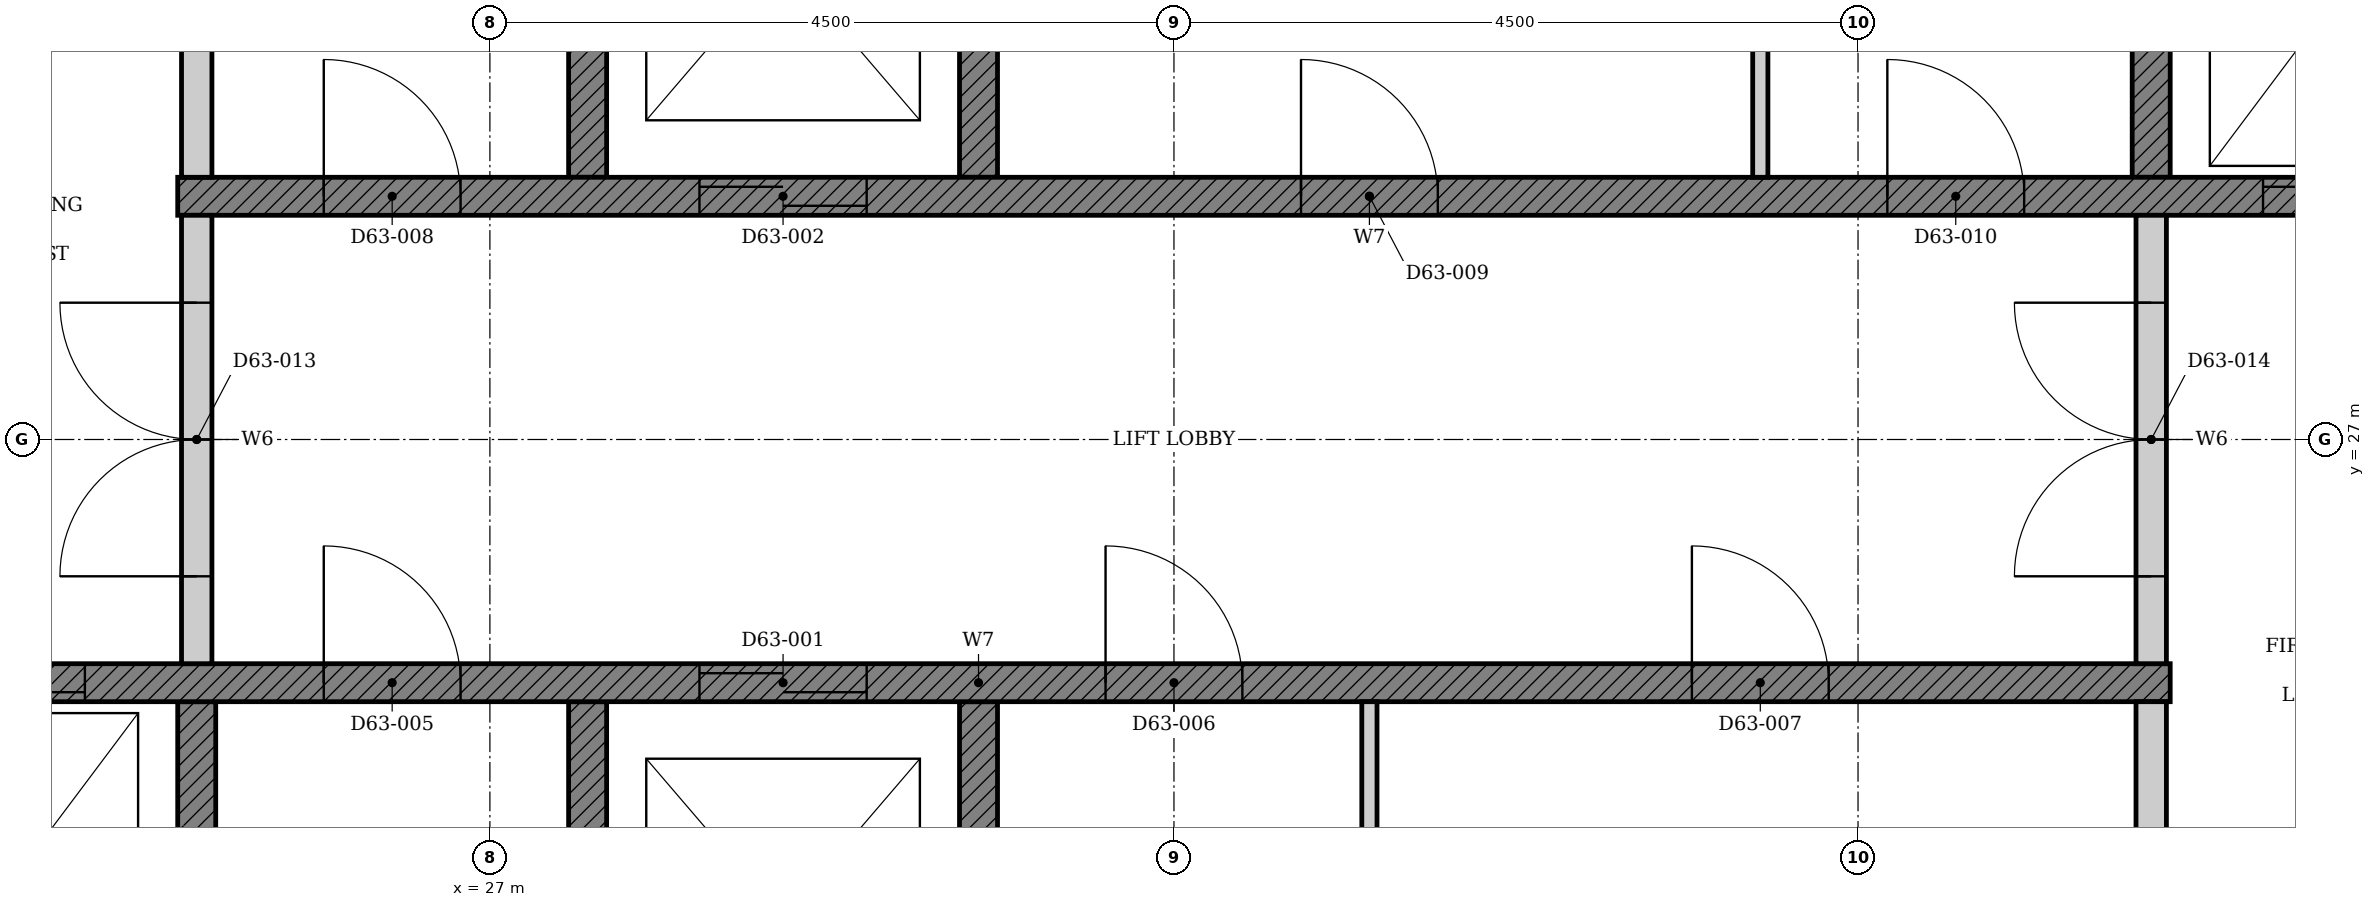
"""IFC4 building model, lengths in metres.
Left out: names, types, materials, properties, quantities, classifications, styles, units other than length and angle.
Written with IfcOpenShell. Run it as: python <this file> out.ifc"""

import sys

from ifc_helpers import new_model, si_unit, direction, frame, frame_2d, origin, place, context, subcontext, project, spatial, polyline, rectangle, outline, extrude, element, fill, save


model = new_model("IFC4")
c1 = context("Model", 3, precision=1e-05, world=origin(), true_north=direction((0.0, 1.0)))
c2 = subcontext(c1, "Body", "Model", "MODEL_VIEW")
j1 = project(units=[si_unit("LENGTHUNIT", "METRE"), si_unit("PLANEANGLEUNIT", "RADIAN")], contexts=[c1])
p1 = place(None, origin())
s1 = spatial("IfcSite", under=j1, at=p1, CompositionType="ELEMENT")
p2 = place(p1, origin())
s2 = spatial("IfcBuilding", under=s1, at=p2, CompositionType="ELEMENT")
p3 = place(p2, frame((0.0, 0.0, 249.0)))
s3 = spatial("IfcBuildingStorey", under=s2, at=p3, CompositionType="ELEMENT", Elevation=249.0)
p4 = place(p3, origin())
e1 = element("IfcWall", 1, at=p4, inside=s3, PredefinedType="SHEAR", context=c2, shape_type="SweptSolid", body=[
    extrude(outline(polyline([(22.375, 22.35), (25.197, 22.35), (25.197, 25.275), (24.947, 25.275), (24.947, 22.65), (22.625, 22.65), (22.625, 25.275), (22.375, 25.275), (22.375, 22.35)])), origin(), (0.0, 0.0, 1.0), 3.4),
])
p5 = place(p3, origin())
e2 = element("IfcWall", 2, at=p5, inside=s3, PredefinedType="SHEAR", context=c2, shape_type="SweptSolid", body=[
    extrude(outline(polyline([(27.518, 22.35), (30.339, 22.35), (30.339, 25.275), (30.089, 25.275), (30.089, 22.65), (27.768, 22.65), (27.768, 25.275), (27.518, 25.275), (27.518, 22.35)])), origin(), (0.0, 0.0, 1.0), 3.4),
])
p6 = place(p3, origin())
e3 = element("IfcWall", 3, at=p6, inside=s3, PredefinedType="SHEAR", context=c2, shape_type="SweptSolid", body=[
    extrude(outline(polyline([(27.518, 28.725), (27.768, 28.725), (27.768, 31.35), (30.089, 31.35), (30.089, 28.725), (30.339, 28.725), (30.339, 31.65), (27.518, 31.65), (27.518, 28.725)])), origin(), (0.0, 0.0, 1.0), 3.4),
])
p7 = place(p3, origin())
e4 = element("IfcWall", 4, at=p7, inside=s3, PredefinedType="SHEAR", context=c2, shape_type="SweptSolid", body=[
    extrude(outline(polyline([(37.803, 28.725), (38.053, 28.725), (38.053, 31.35), (40.375, 31.35), (40.375, 28.725), (40.625, 28.725), (40.625, 31.65), (37.803, 31.65), (37.803, 28.725)])), origin(), (0.0, 0.0, 1.0), 3.4),
])
p8 = place(p3, frame((22.375, 25.4, 0.0), z_axis=(0.0, 0.0, 1.0), x_axis=(1.0, 0.0, 0.0)))
e5 = element("IfcWall", 5, at=p8, inside=s3, PredefinedType="SHEAR", context=c2, shape_type="SweptSolid", body=[
    extrude(rectangle(XDim=15.678, YDim=0.25, at=frame_2d((7.839, 0.0))), origin(), (0.0, 0.0, 1.0), 3.4),
])
p9 = place(p8, frame((6.004, 0.0, 0.0)))
e6 = element("IfcOpeningElement", 6, at=p9, cuts=e5, PredefinedType="OPENING", context=c2, shape_type="SweptSolid", body=[
    extrude(rectangle(XDim=1.1, YDim=2.1, at=frame_2d((0.55, 1.05))), frame((0.0, 0.135, 0.0), z_axis=(0.0, -1.0, 0.0), x_axis=(1.0, 0.0, 0.0)), (0.0, 0.0, 1.0), 0.27),
])
p10 = place(p8, frame((0.861, 0.0, 0.0)))
e7 = element("IfcOpeningElement", 7, at=p10, cuts=e5, PredefinedType="OPENING", context=c2, shape_type="SweptSolid", body=[
    extrude(rectangle(XDim=1.1, YDim=2.1, at=frame_2d((0.55, 1.05))), frame((0.0, 0.135, 0.0), z_axis=(0.0, -1.0, 0.0), x_axis=(1.0, 0.0, 0.0)), (0.0, 0.0, 1.0), 0.27),
])
p11 = place(p8, frame((3.532, 0.0, 0.0)))
e8 = element("IfcOpeningElement", 8, at=p11, cuts=e5, PredefinedType="OPENING", context=c2, shape_type="SweptSolid", body=[
    extrude(rectangle(XDim=0.9, YDim=2.1, at=frame_2d((0.45, 1.05))), frame((0.0, 0.135, 0.0), z_axis=(0.0, -1.0, 0.0), x_axis=(1.0, 0.0, 0.0)), (0.0, 0.0, 1.0), 0.27),
])
p12 = place(p8, frame((8.675, 0.0, 0.0)))
e9 = element("IfcOpeningElement", 9, at=p12, cuts=e5, PredefinedType="OPENING", context=c2, shape_type="SweptSolid", body=[
    extrude(rectangle(XDim=0.9, YDim=2.1, at=frame_2d((0.45, 1.05))), frame((0.0, 0.135, 0.0), z_axis=(0.0, -1.0, 0.0), x_axis=(1.0, 0.0, 0.0)), (0.0, 0.0, 1.0), 0.27),
])
p13 = place(p8, frame((12.532, 0.0, 0.0)))
e10 = element("IfcOpeningElement", 10, at=p13, cuts=e5, PredefinedType="OPENING", context=c2, shape_type="SweptSolid", body=[
    extrude(rectangle(XDim=0.9, YDim=2.1, at=frame_2d((0.45, 1.05))), frame((0.0, 0.135, 0.0), z_axis=(0.0, -1.0, 0.0), x_axis=(1.0, 0.0, 0.0)), (0.0, 0.0, 1.0), 0.27),
])
p14 = place(p3, frame((24.947, 28.6, 0.0), z_axis=(0.0, 0.0, 1.0), x_axis=(1.0, 0.0, 0.0)))
e11 = element("IfcWall", 11, at=p14, inside=s3, PredefinedType="SHEAR", context=c2, shape_type="SweptSolid", body=[
    extrude(rectangle(XDim=15.678, YDim=0.25, at=frame_2d((7.839, 0.0))), origin(), (0.0, 0.0, 1.0), 3.4),
])
p15 = place(p14, frame((3.432, 0.0, 0.0)))
e12 = element("IfcOpeningElement", 12, at=p15, cuts=e11, PredefinedType="OPENING", context=c2, shape_type="SweptSolid", body=[
    extrude(rectangle(XDim=1.1, YDim=2.1, at=frame_2d((0.55, 1.05))), frame((0.0, 0.135, 0.0), z_axis=(0.0, -1.0, 0.0), x_axis=(1.0, 0.0, 0.0)), (0.0, 0.0, 1.0), 0.27),
])
p16 = place(p14, frame((13.718, 0.0, 0.0)))
e13 = element("IfcOpeningElement", 13, at=p16, cuts=e11, PredefinedType="OPENING", context=c2, shape_type="SweptSolid", body=[
    extrude(rectangle(XDim=1.1, YDim=2.1, at=frame_2d((0.55, 1.05))), frame((0.0, 0.135, 0.0), z_axis=(0.0, -1.0, 0.0), x_axis=(1.0, 0.0, 0.0)), (0.0, 0.0, 1.0), 0.27),
])
p17 = place(p14, frame((0.961, 0.0, 0.0)))
e14 = element("IfcOpeningElement", 14, at=p17, cuts=e11, PredefinedType="OPENING", context=c2, shape_type="SweptSolid", body=[
    extrude(rectangle(XDim=0.9, YDim=2.1, at=frame_2d((0.45, 1.05))), frame((0.0, 0.135, 0.0), z_axis=(0.0, -1.0, 0.0), x_axis=(1.0, 0.0, 0.0)), (0.0, 0.0, 1.0), 0.27),
])
p18 = place(p14, frame((7.389, 0.0, 0.0)))
e15 = element("IfcOpeningElement", 15, at=p18, cuts=e11, PredefinedType="OPENING", context=c2, shape_type="SweptSolid", body=[
    extrude(rectangle(XDim=0.9, YDim=2.1, at=frame_2d((0.45, 1.05))), frame((0.0, 0.135, 0.0), z_axis=(0.0, -1.0, 0.0), x_axis=(1.0, 0.0, 0.0)), (0.0, 0.0, 1.0), 0.27),
])
p19 = place(p14, frame((11.246, 0.0, 0.0)))
e16 = element("IfcOpeningElement", 16, at=p19, cuts=e11, PredefinedType="OPENING", context=c2, shape_type="SweptSolid", body=[
    extrude(rectangle(XDim=0.9, YDim=2.1, at=frame_2d((0.45, 1.05))), frame((0.0, 0.135, 0.0), z_axis=(0.0, -1.0, 0.0), x_axis=(1.0, 0.0, 0.0)), (0.0, 0.0, 1.0), 0.27),
])
p20 = place(p3, frame((37.928, 22.65, 0.0), z_axis=(0.0, 0.0, 1.0), x_axis=(0.0, 1.0, 0.0)))
e17 = element("IfcWall", 17, at=p20, inside=s3, PredefinedType="PARTITIONING", context=c2, shape_type="SweptSolid", body=[
    extrude(rectangle(XDim=2.625, YDim=0.2, at=frame_2d((1.312, 0.0))), origin(), (0.0, 0.0, 1.0), 3.4),
])
p21 = place(p3, frame((32.786, 22.65, 0.0), z_axis=(0.0, 0.0, 1.0), x_axis=(0.0, 1.0, 0.0)))
e18 = element("IfcWall", 18, at=p21, inside=s3, PredefinedType="PARTITIONING", context=c2, shape_type="SweptSolid", body=[
    extrude(rectangle(XDim=2.625, YDim=0.1, at=frame_2d((1.312, 0.0))), origin(), (0.0, 0.0, 1.0), 3.4),
])
p22 = place(p3, frame((25.072, 28.725, 0.0), z_axis=(0.0, 0.0, 1.0), x_axis=(0.0, 1.0, 0.0)))
e19 = element("IfcWall", 19, at=p22, inside=s3, PredefinedType="PARTITIONING", context=c2, shape_type="SweptSolid", body=[
    extrude(rectangle(XDim=2.625, YDim=0.2, at=frame_2d((1.312, 0.0))), origin(), (0.0, 0.0, 1.0), 3.4),
])
p23 = place(p3, frame((35.357, 28.725, 0.0), z_axis=(0.0, 0.0, 1.0), x_axis=(0.0, 1.0, 0.0)))
e20 = element("IfcWall", 20, at=p23, inside=s3, PredefinedType="PARTITIONING", context=c2, shape_type="SweptSolid", body=[
    extrude(rectangle(XDim=2.625, YDim=0.1, at=frame_2d((1.312, 0.0))), origin(), (0.0, 0.0, 1.0), 3.4),
])
p24 = place(p3, frame((25.072, 25.525, 0.0), z_axis=(0.0, 0.0, 1.0), x_axis=(0.0, 1.0, 0.0)))
e21 = element("IfcWall", 21, at=p24, inside=s3, PredefinedType="PARTITIONING", context=c2, shape_type="SweptSolid", body=[
    extrude(rectangle(XDim=2.95, YDim=0.2, at=frame_2d((1.475, 0.0))), origin(), (0.0, 0.0, 1.0), 3.4),
])
p25 = place(p24, frame((0.575, 0.0, 0.0)))
e22 = element("IfcOpeningElement", 22, at=p25, cuts=e21, PredefinedType="OPENING", context=c2, shape_type="SweptSolid", body=[
    extrude(rectangle(XDim=1.8, YDim=2.1, at=frame_2d((0.9, 1.05))), frame((0.0, 0.11, 0.0), z_axis=(0.0, -1.0, 0.0), x_axis=(1.0, 0.0, 0.0)), (0.0, 0.0, 1.0), 0.22),
])
p26 = place(p3, frame((37.928, 25.525, 0.0), z_axis=(0.0, 0.0, 1.0), x_axis=(0.0, 1.0, 0.0)))
e23 = element("IfcWall", 23, at=p26, inside=s3, PredefinedType="PARTITIONING", context=c2, shape_type="SweptSolid", body=[
    extrude(rectangle(XDim=2.95, YDim=0.2, at=frame_2d((1.475, 0.0))), origin(), (0.0, 0.0, 1.0), 3.4),
])
p27 = place(p26, frame((0.575, 0.0, 0.0)))
e24 = element("IfcOpeningElement", 24, at=p27, cuts=e23, PredefinedType="OPENING", context=c2, shape_type="SweptSolid", body=[
    extrude(rectangle(XDim=1.8, YDim=2.1, at=frame_2d((0.9, 1.05))), frame((0.0, 0.11, 0.0), z_axis=(0.0, -1.0, 0.0), x_axis=(1.0, 0.0, 0.0)), (0.0, 0.0, 1.0), 0.22),
])
p28 = place(p9, origin())
e25 = element("IfcDoor", 25, at=p28, inside=s3, OperationType="DOUBLE_DOOR_SLIDING", PredefinedType="DOOR", context=c2, shape_type="SweptSolid", body=[
    extrude(rectangle(XDim=1.1, YDim=2.1, at=frame_2d((0.55, 1.05))), frame((0.0, 0.025, 0.0), z_axis=(0.0, -1.0, 0.0), x_axis=(1.0, 0.0, 0.0)), (0.0, 0.0, 1.0), 0.05),
])
fill(e6, e25)
p29 = place(p15, origin())
e26 = element("IfcDoor", 26, at=p29, inside=s3, OperationType="DOUBLE_DOOR_SLIDING", PredefinedType="DOOR", context=c2, shape_type="SweptSolid", body=[
    extrude(rectangle(XDim=1.1, YDim=2.1, at=frame_2d((0.55, 1.05))), frame((0.0, 0.025, 0.0), z_axis=(0.0, -1.0, 0.0), x_axis=(1.0, 0.0, 0.0)), (0.0, 0.0, 1.0), 0.05),
])
fill(e12, e26)
p30 = place(p10, origin())
e27 = element("IfcDoor", 27, at=p30, inside=s3, OperationType="DOUBLE_DOOR_SLIDING", PredefinedType="DOOR", context=c2, shape_type="SweptSolid", body=[
    extrude(rectangle(XDim=1.1, YDim=2.1, at=frame_2d((0.55, 1.05))), frame((0.0, 0.025, 0.0), z_axis=(0.0, -1.0, 0.0), x_axis=(1.0, 0.0, 0.0)), (0.0, 0.0, 1.0), 0.05),
])
fill(e7, e27)
p31 = place(p16, origin())
e28 = element("IfcDoor", 28, at=p31, inside=s3, OperationType="DOUBLE_DOOR_SLIDING", PredefinedType="DOOR", context=c2, shape_type="SweptSolid", body=[
    extrude(rectangle(XDim=1.1, YDim=2.1, at=frame_2d((0.55, 1.05))), frame((0.0, 0.025, 0.0), z_axis=(0.0, -1.0, 0.0), x_axis=(1.0, 0.0, 0.0)), (0.0, 0.0, 1.0), 0.05),
])
fill(e13, e28)
p32 = place(p11, origin())
e29 = element("IfcDoor", 29, at=p32, inside=s3, OperationType="SINGLE_SWING_LEFT", PredefinedType="DOOR", context=c2, shape_type="SweptSolid", body=[
    extrude(rectangle(XDim=0.9, YDim=2.1, at=frame_2d((0.45, 1.05))), frame((0.0, 0.025, 0.0), z_axis=(0.0, -1.0, 0.0), x_axis=(1.0, 0.0, 0.0)), (0.0, 0.0, 1.0), 0.05),
])
fill(e8, e29)
p33 = place(p12, origin())
e30 = element("IfcDoor", 30, at=p33, inside=s3, OperationType="SINGLE_SWING_LEFT", PredefinedType="DOOR", context=c2, shape_type="SweptSolid", body=[
    extrude(rectangle(XDim=0.9, YDim=2.1, at=frame_2d((0.45, 1.05))), frame((0.0, 0.025, 0.0), z_axis=(0.0, -1.0, 0.0), x_axis=(1.0, 0.0, 0.0)), (0.0, 0.0, 1.0), 0.05),
])
fill(e9, e30)
p34 = place(p13, origin())
e31 = element("IfcDoor", 31, at=p34, inside=s3, OperationType="SINGLE_SWING_LEFT", PredefinedType="DOOR", context=c2, shape_type="SweptSolid", body=[
    extrude(rectangle(XDim=0.9, YDim=2.1, at=frame_2d((0.45, 1.05))), frame((0.0, 0.025, 0.0), z_axis=(0.0, -1.0, 0.0), x_axis=(1.0, 0.0, 0.0)), (0.0, 0.0, 1.0), 0.05),
])
fill(e10, e31)
p35 = place(p17, origin())
e32 = element("IfcDoor", 32, at=p35, inside=s3, OperationType="SINGLE_SWING_LEFT", PredefinedType="DOOR", context=c2, shape_type="SweptSolid", body=[
    extrude(rectangle(XDim=0.9, YDim=2.1, at=frame_2d((0.45, 1.05))), frame((0.0, 0.025, 0.0), z_axis=(0.0, -1.0, 0.0), x_axis=(1.0, 0.0, 0.0)), (0.0, 0.0, 1.0), 0.05),
])
fill(e14, e32)
p36 = place(p18, origin())
e33 = element("IfcDoor", 33, at=p36, inside=s3, OperationType="SINGLE_SWING_LEFT", PredefinedType="DOOR", context=c2, shape_type="SweptSolid", body=[
    extrude(rectangle(XDim=0.9, YDim=2.1, at=frame_2d((0.45, 1.05))), frame((0.0, 0.025, 0.0), z_axis=(0.0, -1.0, 0.0), x_axis=(1.0, 0.0, 0.0)), (0.0, 0.0, 1.0), 0.05),
])
fill(e15, e33)
p37 = place(p19, origin())
e34 = element("IfcDoor", 34, at=p37, inside=s3, OperationType="SINGLE_SWING_LEFT", PredefinedType="DOOR", context=c2, shape_type="SweptSolid", body=[
    extrude(rectangle(XDim=0.9, YDim=2.1, at=frame_2d((0.45, 1.05))), frame((0.0, 0.025, 0.0), z_axis=(0.0, -1.0, 0.0), x_axis=(1.0, 0.0, 0.0)), (0.0, 0.0, 1.0), 0.05),
])
fill(e16, e34)
p38 = place(p25, origin())
e35 = element("IfcDoor", 35, at=p38, inside=s3, OperationType="DOUBLE_DOOR_SINGLE_SWING", PredefinedType="DOOR", context=c2, shape_type="SweptSolid", body=[
    extrude(rectangle(XDim=1.8, YDim=2.1, at=frame_2d((0.9, 1.05))), frame((0.0, 0.025, 0.0), z_axis=(0.0, -1.0, 0.0), x_axis=(1.0, 0.0, 0.0)), (0.0, 0.0, 1.0), 0.05),
])
fill(e22, e35)
p39 = place(p27, origin())
e36 = element("IfcDoor", 36, at=p39, inside=s3, OperationType="DOUBLE_DOOR_SINGLE_SWING", PredefinedType="DOOR", context=c2, shape_type="SweptSolid", body=[
    extrude(rectangle(XDim=1.8, YDim=2.1, at=frame_2d((0.9, 1.05))), frame((0.0, 0.025, 0.0), z_axis=(0.0, -1.0, 0.0), x_axis=(1.0, 0.0, 0.0)), (0.0, 0.0, 1.0), 0.05),
])
fill(e24, e36)
save(model, sys.argv[1])
